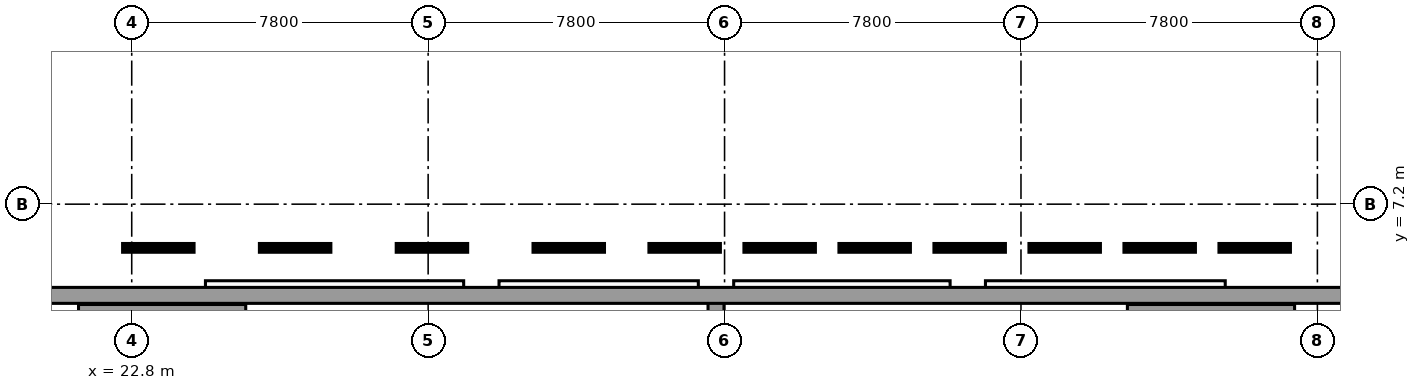
"""IFC4 building model, lengths in metres.
Left out: names, types, materials, properties, quantities, classifications, styles, units other than length and angle.
Written with IfcOpenShell. Run it as: python <this file> out.ifc"""

import sys

from ifc_helpers import new_model, si_unit, direction, frame, frame_2d, origin, place, context, subcontext, project, spatial, rectangle, extrude, element, save


model = new_model("IFC4")
c1 = context("Model", 3, precision=1e-05, world=origin(), true_north=direction((0.0, 1.0)))
c2 = subcontext(c1, "Body", "Model", "MODEL_VIEW")
j1 = project(units=[si_unit("LENGTHUNIT", "METRE"), si_unit("PLANEANGLEUNIT", "RADIAN")], contexts=[c1])
p1 = place(None, origin())
s1 = spatial("IfcSite", under=j1, at=p1, CompositionType="ELEMENT")
p2 = place(p1, origin())
s2 = spatial("IfcBuilding", under=s1, at=p2, CompositionType="ELEMENT")
p3 = place(p2, frame((0.0, 0.0, -8.16)))
s3 = spatial("IfcBuildingStorey", under=s2, at=p3, CompositionType="ELEMENT", Elevation=-8.16)
for number, where, z_axis, x_axis in (
    (1, (24.275, 2.4, 0.0), (0.0, 0.0, 1.0), (0.0, 1.0, 0.0)),
    (2, (38.175, 2.4, 0.0), (0.0, 0.0, 1.0), (0.0, 1.0, 0.0)),
    (3, (52.075, 2.4, 0.0), (0.0, 0.0, 1.0), (0.0, 1.0, 0.0)),
):
    element("IfcWall", number, at=place(p3, frame(where, z_axis=z_axis, x_axis=x_axis)), inside=s3, PredefinedType="SOLIDWALL", context=c2, shape_type="SweptSolid", body=[
        extrude(rectangle(XDim=2.4, YDim=0.42, at=frame_2d((1.2, 0.0))), origin(), (0.0, 0.0, 1.0), 4.08),
    ])
p4 = place(p3, frame((21.4, 4.35, 0.0), z_axis=(0.0, 0.0, 1.0), x_axis=(1.0, 0.0, 0.0)))
e4 = element("IfcWall", 4, at=p4, inside=s3, PredefinedType="SOLIDWALL", context=c2, shape_type="SweptSolid", body=[
    extrude(rectangle(XDim=4.4, YDim=0.42, at=frame_2d((2.2, 0.0))), origin(), (0.0, 0.0, 1.0), 4.08),
])
p5 = place(p3, frame((49.0, 4.35, 0.0), z_axis=(0.0, 0.0, 1.0), x_axis=(1.0, 0.0, 0.0)))
e5 = element("IfcWall", 5, at=p5, inside=s3, PredefinedType="SOLIDWALL", context=c2, shape_type="SweptSolid", body=[
    extrude(rectangle(XDim=4.4, YDim=0.42, at=frame_2d((2.2, 0.0))), origin(), (0.0, 0.0, 1.0), 4.08),
])
p6 = place(p3, frame((1.7, 4.8, 0.0), z_axis=(0.0, 0.0, 1.0), x_axis=(1.0, 0.0, 0.0)))
e6 = element("IfcWall", 6, at=p6, inside=s3, PredefinedType="SOLIDWALL", context=c2, shape_type="SweptSolid", body=[
    extrude(rectangle(XDim=73.4, YDim=0.42, at=frame_2d((36.7, 0.0))), origin(), (0.0, 0.0, 1.0), 3.76),
])
save(model, sys.argv[1])
